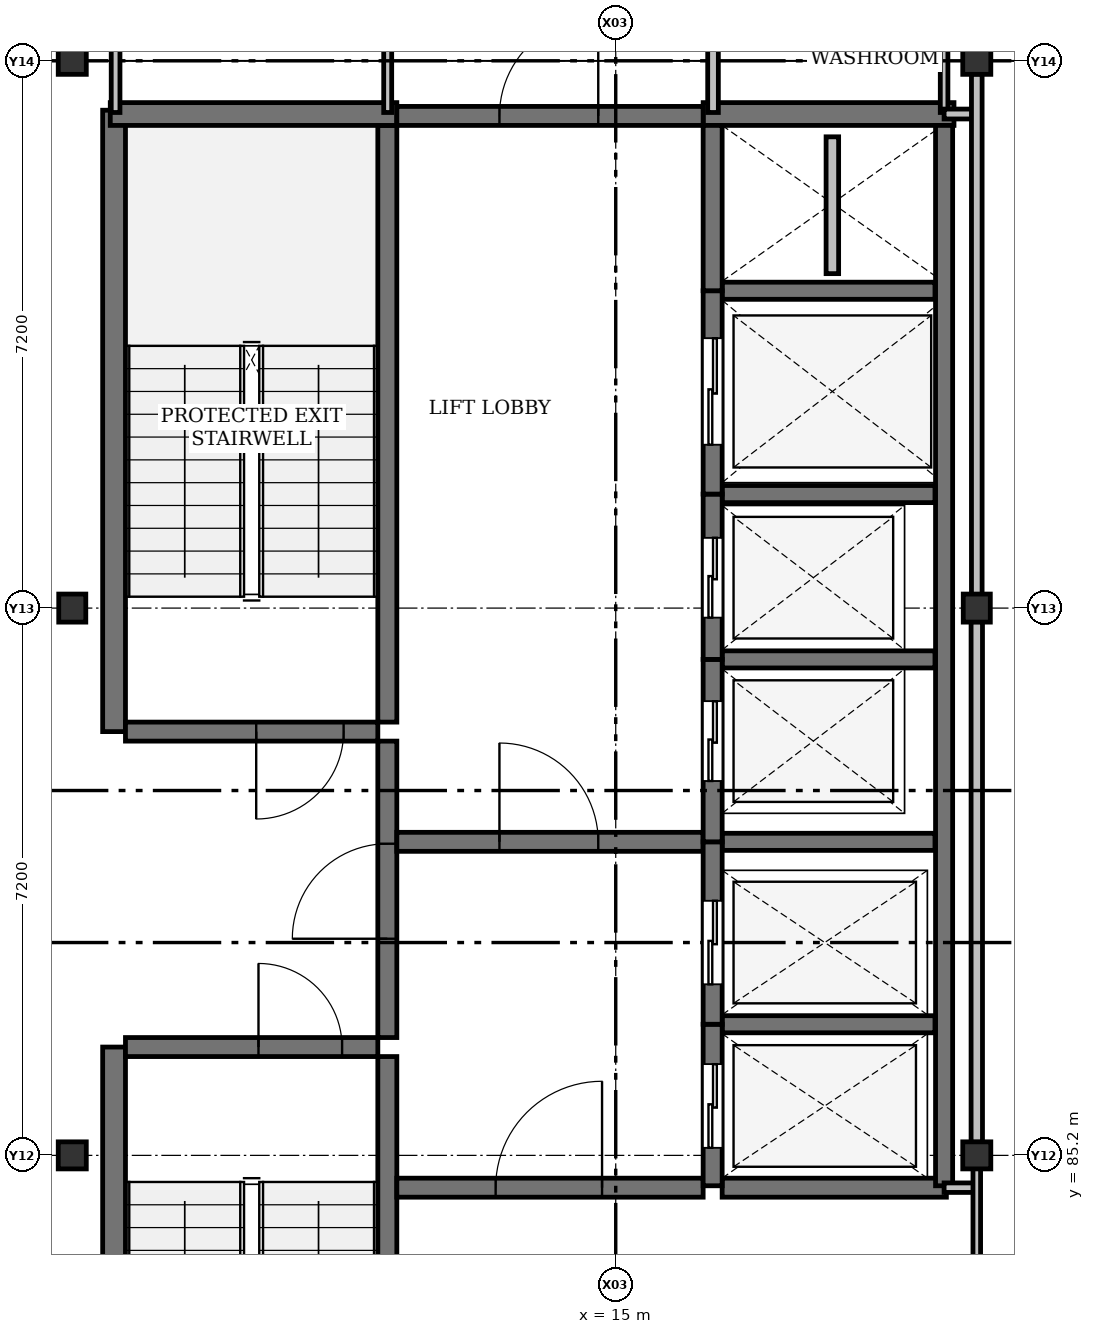
"""IFC4 building model, lengths in metres.
Left out: names, types, materials, properties, quantities, classifications, styles, units other than length and angle.
Written with IfcOpenShell. Run it as: python <this file> out.ifc"""

import sys

from ifc_helpers import new_model, si_unit, direction, frame, frame_2d, origin, origin_2d, place, context, subcontext, project, spatial, rectangle, i_section, extrude, element, fill, save


model = new_model("IFC4")
c1 = context("Model", 3, precision=1e-05, world=origin(), true_north=direction((0.0, 1.0)))
c2 = subcontext(c1, "Body", "Model", "MODEL_VIEW")
j1 = project(units=[si_unit("LENGTHUNIT", "METRE"), si_unit("PLANEANGLEUNIT", "RADIAN")], contexts=[c1])
p1 = place(None, origin())
s1 = spatial("IfcSite", under=j1, at=p1, CompositionType="ELEMENT")
p2 = place(p1, origin())
s2 = spatial("IfcBuilding", under=s1, at=p2, CompositionType="ELEMENT")
p3 = place(p2, frame((0.0, 0.0, 51.9)))
s3 = spatial("IfcBuildingStorey", under=s2, at=p3, CompositionType="ELEMENT", Elevation=51.9)
for number, where, z_axis, x_axis in (
    (1, (7.85, 85.2, 0.0), (0.0, 0.0, 1.0), (1.0, 0.0, 0.0)),
    (2, (19.75, 85.2, 0.0), (0.0, 0.0, 1.0), (1.0, 0.0, 0.0)),
    (3, (7.85, 92.4, 0.0), (0.0, 0.0, 1.0), (0.0, 1.0, 0.0)),
    (4, (19.75, 92.4, 0.0), (0.0, 0.0, 1.0), (0.0, 1.0, 0.0)),
    (5, (7.85, 99.6, 0.0), (0.0, 0.0, 1.0), (1.0, 0.0, 0.0)),
    (6, (19.75, 99.6, 0.0), (0.0, 0.0, 1.0), (1.0, 0.0, 0.0)),
):
    element("IfcColumn", number, at=place(p3, frame(where, z_axis=z_axis, x_axis=x_axis)), inside=s3, PredefinedType="COLUMN", context=c2, shape_type="SweptSolid", body=[
        extrude(i_section(OverallWidth=0.369, OverallDepth=0.356, WebThickness=0.011, FlangeThickness=0.018, FilletRadius=0.015, at=origin_2d()), origin(), (0.0, 0.0, 1.0), 4.2),
    ])
for number, where, z_axis, x_axis in (
    (7, (8.4, 78.45, 0.0), (0.0, 0.0, 1.0), (0.0, 1.0, 0.0)),
    (8, (8.4, 90.775, 0.0), (0.0, 0.0, 1.0), (0.0, 1.0, 0.0)),
):
    element("IfcWall", number, at=place(p3, frame(where, z_axis=z_axis, x_axis=x_axis)), inside=s3, PredefinedType="SHEAR", context=c2, shape_type="SweptSolid", body=[
        extrude(rectangle(XDim=8.175, YDim=0.3, at=frame_2d((4.087, 0.0))), origin(), (0.0, 0.0, 1.0), 4.2),
    ])
for number, where, z_axis, x_axis in (
    (9, (11.995, 78.65, 0.0), (0.0, 0.0, 1.0), (0.0, 1.0, 0.0)),
    (10, (11.995, 90.9, 0.0), (0.0, 0.0, 1.0), (0.0, 1.0, 0.0)),
):
    element("IfcWall", number, at=place(p3, frame(where, z_axis=z_axis, x_axis=x_axis)), inside=s3, PredefinedType="SHEAR", context=c2, shape_type="SweptSolid", body=[
        extrude(rectangle(XDim=7.85, YDim=0.25, at=frame_2d((3.925, 0.0))), origin(), (0.0, 0.0, 1.0), 4.2),
    ])
p4 = place(p3, frame((11.995, 86.75, 0.0), z_axis=(0.0, 0.0, 1.0), x_axis=(0.0, 1.0, 0.0)))
e11 = element("IfcWall", 11, at=p4, inside=s3, PredefinedType="SHEAR", context=c2, shape_type="SweptSolid", body=[
    extrude(rectangle(XDim=3.9, YDim=0.25, at=frame_2d((1.95, 0.0))), origin(), (0.0, 0.0, 1.0), 4.2),
])
p5 = place(p4, frame((1.3, 0.0, 0.0)))
e12 = element("IfcOpeningElement", 12, at=p5, cuts=e11, PredefinedType="OPENING", context=c2, shape_type="SweptSolid", body=[
    extrude(rectangle(XDim=1.25, YDim=2.2, at=frame_2d((0.625, 1.1))), frame((0.0, 0.125, 0.0), z_axis=(0.0, -1.0, 0.0), x_axis=(1.0, 0.0, 0.0)), (0.0, 0.0, 1.0), 0.25),
])
p6 = place(p3, frame((8.35, 98.9, 0.0), z_axis=(0.0, 0.0, 1.0), x_axis=(1.0, 0.0, 0.0)))
e13 = element("IfcWall", 13, at=p6, inside=s3, PredefinedType="SHEAR", context=c2, shape_type="SweptSolid", body=[
    extrude(rectangle(XDim=3.77, YDim=0.3, at=frame_2d((1.885, 0.0))), origin(), (0.0, 0.0, 1.0), 4.2),
])
p7 = place(p3, frame((16.15, 98.9, 0.0), z_axis=(0.0, 0.0, 1.0), x_axis=(1.0, 0.0, 0.0)))
e14 = element("IfcWall", 14, at=p7, inside=s3, PredefinedType="SHEAR", context=c2, shape_type="SweptSolid", body=[
    extrude(rectangle(XDim=3.3, YDim=0.3, at=frame_2d((1.65, 0.0))), origin(), (0.0, 0.0, 1.0), 4.2),
])
p8 = place(p3, frame((12.12, 98.875, 0.0), z_axis=(0.0, 0.0, 1.0), x_axis=(1.0, 0.0, 0.0)))
e15 = element("IfcWall", 15, at=p8, inside=s3, PredefinedType="SHEAR", context=c2, shape_type="SweptSolid", body=[
    extrude(rectangle(XDim=4.03, YDim=0.25, at=frame_2d((2.015, 0.0))), origin(), (0.0, 0.0, 1.0), 4.2),
])
p9 = place(p8, frame((1.35, 0.0, 0.0)))
e16 = element("IfcOpeningElement", 16, at=p9, cuts=e15, PredefinedType="OPENING", context=c2, shape_type="SweptSolid", body=[
    extrude(rectangle(XDim=1.3, YDim=2.2, at=frame_2d((0.65, 1.1))), frame((0.0, 0.125, 0.0), z_axis=(0.0, -1.0, 0.0), x_axis=(1.0, 0.0, 0.0)), (0.0, 0.0, 1.0), 0.25),
])
p10 = place(p3, frame((8.55, 86.625, 0.0), z_axis=(0.0, 0.0, 1.0), x_axis=(1.0, 0.0, 0.0)))
e17 = element("IfcWall", 17, at=p10, inside=s3, PredefinedType="SHEAR", context=c2, shape_type="SweptSolid", body=[
    extrude(rectangle(XDim=3.32, YDim=0.25, at=frame_2d((1.66, 0.0))), origin(), (0.0, 0.0, 1.0), 4.2),
])
p11 = place(p10, frame((1.75, 0.0, 0.0)))
e18 = element("IfcOpeningElement", 18, at=p11, cuts=e17, PredefinedType="OPENING", context=c2, shape_type="SweptSolid", body=[
    extrude(rectangle(XDim=1.1, YDim=2.15, at=frame_2d((0.55, 1.075))), frame((0.0, 0.125, 0.0), z_axis=(0.0, -1.0, 0.0), x_axis=(1.0, 0.0, 0.0)), (0.0, 0.0, 1.0), 0.25),
])
p12 = place(p3, frame((11.87, 90.775, 0.0), z_axis=(0.0, 0.0, 1.0), x_axis=(-1.0, 0.0, 0.0)))
e19 = element("IfcWall", 19, at=p12, inside=s3, PredefinedType="SHEAR", context=c2, shape_type="SweptSolid", body=[
    extrude(rectangle(XDim=3.32, YDim=0.25, at=frame_2d((1.66, 0.0))), origin(), (0.0, 0.0, 1.0), 4.2),
])
p13 = place(p12, frame((0.45, 0.0, 0.0)))
e20 = element("IfcOpeningElement", 20, at=p13, cuts=e19, PredefinedType="OPENING", context=c2, shape_type="SweptSolid", body=[
    extrude(rectangle(XDim=1.15, YDim=2.15, at=frame_2d((0.575, 1.075))), frame((0.0, 0.125, 0.0), z_axis=(0.0, -1.0, 0.0), x_axis=(1.0, 0.0, 0.0)), (0.0, 0.0, 1.0), 0.25),
])
p14 = place(p3, frame((12.12, 89.325, 0.0), z_axis=(0.0, 0.0, 1.0), x_axis=(1.0, 0.0, 0.0)))
e21 = element("IfcWall", 21, at=p14, inside=s3, PredefinedType="SHEAR", context=c2, shape_type="SweptSolid", body=[
    extrude(rectangle(XDim=4.03, YDim=0.25, at=frame_2d((2.015, 0.0))), origin(), (0.0, 0.0, 1.0), 4.2),
])
p15 = place(p14, frame((1.35, 0.0, 0.0)))
e22 = element("IfcOpeningElement", 22, at=p15, cuts=e21, PredefinedType="OPENING", context=c2, shape_type="SweptSolid", body=[
    extrude(rectangle(XDim=1.3, YDim=2.2, at=frame_2d((0.65, 1.1))), frame((0.0, 0.125, 0.0), z_axis=(0.0, -1.0, 0.0), x_axis=(1.0, 0.0, 0.0)), (0.0, 0.0, 1.0), 0.25),
])
p16 = place(p3, frame((12.12, 84.775, 0.0), z_axis=(0.0, 0.0, 1.0), x_axis=(1.0, 0.0, 0.0)))
e23 = element("IfcWall", 23, at=p16, inside=s3, PredefinedType="SHEAR", context=c2, shape_type="SweptSolid", body=[
    extrude(rectangle(XDim=4.03, YDim=0.25, at=frame_2d((2.015, 0.0))), origin(), (0.0, 0.0, 1.0), 4.2),
])
p17 = place(p16, frame((1.3, 0.0, 0.0)))
e24 = element("IfcOpeningElement", 24, at=p17, cuts=e23, PredefinedType="OPENING", context=c2, shape_type="SweptSolid", body=[
    extrude(rectangle(XDim=1.4, YDim=2.25, at=frame_2d((0.7, 1.125))), frame((0.0, 0.125, 0.0), z_axis=(0.0, -1.0, 0.0), x_axis=(1.0, 0.0, 0.0)), (0.0, 0.0, 1.0), 0.25),
])
p18 = place(p3, frame((16.4, 84.775, 0.0), z_axis=(0.0, 0.0, 1.0), x_axis=(1.0, 0.0, 0.0)))
e25 = element("IfcWall", 25, at=p18, inside=s3, PredefinedType="SHEAR", context=c2, shape_type="SweptSolid", body=[
    extrude(rectangle(XDim=2.95, YDim=0.25, at=frame_2d((1.475, 0.0))), origin(), (0.0, 0.0, 1.0), 4.2),
])
p19 = place(p3, frame((19.32, 84.8, 0.0), z_axis=(0.0, 0.0, 1.0), x_axis=(0.0, 1.0, 0.0)))
e26 = element("IfcWall", 26, at=p19, inside=s3, PredefinedType="SHEAR", context=c2, shape_type="SweptSolid", body=[
    extrude(rectangle(XDim=13.95, YDim=0.225, at=frame_2d((6.975, 0.0))), origin(), (0.0, 0.0, 1.0), 4.2),
])
for number, where, z_axis, x_axis in (
    (27, (16.4, 86.925, 0.0), (0.0, 0.0, 1.0), (1.0, 0.0, 0.0)),
    (28, (16.4, 89.325, 0.0), (0.0, 0.0, 1.0), (1.0, 0.0, 0.0)),
    (29, (16.4, 91.725, 0.0), (0.0, 0.0, 1.0), (1.0, 0.0, 0.0)),
    (30, (16.4, 93.9, 0.0), (0.0, 0.0, 1.0), (1.0, 0.0, 0.0)),
    (31, (16.4, 96.575, 0.0), (0.0, 0.0, 1.0), (1.0, 0.0, 0.0)),
):
    element("IfcWall", number, at=place(p3, frame(where, z_axis=z_axis, x_axis=x_axis)), inside=s3, PredefinedType="SHEAR", context=c2, shape_type="SweptSolid", body=[
        extrude(rectangle(XDim=2.8, YDim=0.225, at=frame_2d((1.4, 0.0))), origin(), (0.0, 0.0, 1.0), 4.2),
    ])
p20 = place(p3, frame((16.275, 84.8, 0.0), z_axis=(0.0, 0.0, 1.0), x_axis=(0.0, 1.0, 0.0)))
e32 = element("IfcWall", 32, at=p20, inside=s3, PredefinedType="SHEAR", context=c2, shape_type="SweptSolid", body=[
    extrude(rectangle(XDim=2.125, YDim=0.25, at=frame_2d((1.062, 0.0))), origin(), (0.0, 0.0, 1.0), 4.2),
])
p21 = place(p20, frame((0.5, 0.0, 0.0)))
e33 = element("IfcOpeningElement", 33, at=p21, cuts=e32, PredefinedType="OPENING", context=c2, shape_type="SweptSolid", body=[
    extrude(rectangle(XDim=1.1, YDim=2.15, at=frame_2d((0.55, 1.075))), frame((0.0, 0.125, 0.0), z_axis=(0.0, -1.0, 0.0), x_axis=(1.0, 0.0, 0.0)), (0.0, 0.0, 1.0), 0.25),
])
p22 = place(p3, frame((16.275, 86.925, 0.0), z_axis=(0.0, 0.0, 1.0), x_axis=(0.0, 1.0, 0.0)))
e34 = element("IfcWall", 34, at=p22, inside=s3, PredefinedType="SHEAR", context=c2, shape_type="SweptSolid", body=[
    extrude(rectangle(XDim=2.4, YDim=0.25, at=frame_2d((1.2, 0.0))), origin(), (0.0, 0.0, 1.0), 4.2),
])
p23 = place(p22, frame((0.525, 0.0, 0.0)))
e35 = element("IfcOpeningElement", 35, at=p23, cuts=e34, PredefinedType="OPENING", context=c2, shape_type="SweptSolid", body=[
    extrude(rectangle(XDim=1.1, YDim=2.15, at=frame_2d((0.55, 1.075))), frame((0.0, 0.125, 0.0), z_axis=(0.0, -1.0, 0.0), x_axis=(1.0, 0.0, 0.0)), (0.0, 0.0, 1.0), 0.25),
])
p24 = place(p3, frame((16.275, 89.325, 0.0), z_axis=(0.0, 0.0, 1.0), x_axis=(0.0, 1.0, 0.0)))
e36 = element("IfcWall", 36, at=p24, inside=s3, PredefinedType="SHEAR", context=c2, shape_type="SweptSolid", body=[
    extrude(rectangle(XDim=2.4, YDim=0.25, at=frame_2d((1.2, 0.0))), origin(), (0.0, 0.0, 1.0), 4.2),
])
p25 = place(p24, frame((0.8, 0.0, 0.0)))
e37 = element("IfcOpeningElement", 37, at=p25, cuts=e36, PredefinedType="OPENING", context=c2, shape_type="SweptSolid", body=[
    extrude(rectangle(XDim=1.05, YDim=2.15, at=frame_2d((0.525, 1.075))), frame((0.0, 0.125, 0.0), z_axis=(0.0, -1.0, 0.0), x_axis=(1.0, 0.0, 0.0)), (0.0, 0.0, 1.0), 0.25),
])
p26 = place(p3, frame((16.275, 91.725, 0.0), z_axis=(0.0, 0.0, 1.0), x_axis=(0.0, 1.0, 0.0)))
e38 = element("IfcWall", 38, at=p26, inside=s3, PredefinedType="SHEAR", context=c2, shape_type="SweptSolid", body=[
    extrude(rectangle(XDim=2.175, YDim=0.25, at=frame_2d((1.087, 0.0))), origin(), (0.0, 0.0, 1.0), 4.2),
])
p27 = place(p26, frame((0.55, 0.0, 0.0)))
e39 = element("IfcOpeningElement", 39, at=p27, cuts=e38, PredefinedType="OPENING", context=c2, shape_type="SweptSolid", body=[
    extrude(rectangle(XDim=1.05, YDim=2.15, at=frame_2d((0.525, 1.075))), frame((0.0, 0.125, 0.0), z_axis=(0.0, -1.0, 0.0), x_axis=(1.0, 0.0, 0.0)), (0.0, 0.0, 1.0), 0.25),
])
p28 = place(p3, frame((16.275, 93.9, 0.0), z_axis=(0.0, 0.0, 1.0), x_axis=(0.0, 1.0, 0.0)))
e40 = element("IfcWall", 40, at=p28, inside=s3, PredefinedType="SHEAR", context=c2, shape_type="SweptSolid", body=[
    extrude(rectangle(XDim=2.675, YDim=0.25, at=frame_2d((1.337, 0.0))), origin(), (0.0, 0.0, 1.0), 4.2),
])
p29 = place(p28, frame((0.65, 0.0, 0.0)))
e41 = element("IfcOpeningElement", 41, at=p29, cuts=e40, PredefinedType="OPENING", context=c2, shape_type="SweptSolid", body=[
    extrude(rectangle(XDim=1.4, YDim=2.25, at=frame_2d((0.7, 1.125))), frame((0.0, 0.125, 0.0), z_axis=(0.0, -1.0, 0.0), x_axis=(1.0, 0.0, 0.0)), (0.0, 0.0, 1.0), 0.25),
])
p30 = place(p3, frame((16.275, 96.575, 0.0), z_axis=(0.0, 0.0, 1.0), x_axis=(0.0, 1.0, 0.0)))
e42 = element("IfcWall", 42, at=p30, inside=s3, PredefinedType="SHEAR", context=c2, shape_type="SweptSolid", body=[
    extrude(rectangle(XDim=2.175, YDim=0.25, at=frame_2d((1.087, 0.0))), origin(), (0.0, 0.0, 1.0), 4.2),
])
p31 = place(p3, frame((17.85, 96.8, 0.0), z_axis=(0.0, 0.0, 1.0), x_axis=(0.0, 1.0, 0.0)))
e43 = element("IfcWall", 43, at=p31, inside=s3, PredefinedType="PLUMBINGWALL", context=c2, shape_type="SweptSolid", body=[
    extrude(rectangle(XDim=1.8, YDim=0.165, at=frame_2d((0.9, 0.0))), origin(), (0.0, 0.0, 1.0), 4.2),
])
p32 = place(p3, frame((8.42, 98.92, 0.0), z_axis=(0.0, 0.0, 1.0), x_axis=(0.0, 1.0, 0.0)))
e44 = element("IfcWall", 44, at=p32, inside=s3, PredefinedType="PARTITIONING", context=c2, shape_type="SweptSolid", body=[
    extrude(rectangle(XDim=2.74, YDim=0.115, at=frame_2d((1.37, 0.0))), origin(), (0.0, 0.0, 1.0), 3.451),
])
p33 = place(p3, frame((12.0, 101.6, 0.0), z_axis=(0.0, 0.0, 1.0), x_axis=(0.0, -1.0, 0.0)))
e45 = element("IfcWall", 45, at=p33, inside=s3, PredefinedType="PARTITIONING", context=c2, shape_type="SweptSolid", body=[
    extrude(rectangle(XDim=2.68, YDim=0.105, at=frame_2d((1.34, 0.0))), origin(), (0.0, 0.0, 1.0), 3.451),
])
p34 = place(p33, frame((0.84, 0.0, 0.0)))
e46 = element("IfcOpeningElement", 46, at=p34, cuts=e45, PredefinedType="OPENING", context=c2, shape_type="SweptSolid", body=[
    extrude(rectangle(XDim=1.0, YDim=2.25, at=frame_2d((0.5, 1.125))), frame((0.0, 0.052, 0.0), z_axis=(0.0, -1.0, 0.0), x_axis=(1.0, 0.0, 0.0)), (0.0, 0.0, 1.0), 0.105),
])
p35 = place(p3, frame((19.32, 98.92, 0.0), z_axis=(0.0, 0.0, 1.0), x_axis=(0.0, 1.0, 0.0)))
e47 = element("IfcWall", 47, at=p35, inside=s3, PredefinedType="PARTITIONING", context=c2, shape_type="SweptSolid", body=[
    extrude(rectangle(XDim=2.74, YDim=0.1, at=frame_2d((1.37, 0.0))), origin(), (0.0, 0.0, 1.0), 3.451),
])
p36 = place(p3, frame((16.28, 98.92, 0.0), z_axis=(0.0, 0.0, 1.0), x_axis=(0.0, 1.0, 0.0)))
e48 = element("IfcWall", 48, at=p36, inside=s3, PredefinedType="PARTITIONING", context=c2, shape_type="SweptSolid", body=[
    extrude(rectangle(XDim=2.68, YDim=0.14, at=frame_2d((1.34, 0.0))), origin(), (0.0, 0.0, 1.0), 3.451),
])
p37 = place(p36, frame((0.89, 0.0, 0.0)))
e49 = element("IfcOpeningElement", 49, at=p37, cuts=e48, PredefinedType="OPENING", context=c2, shape_type="SweptSolid", body=[
    extrude(rectangle(XDim=0.9, YDim=2.08, at=frame_2d((0.45, 1.04))), frame((0.0, 0.07, 0.0), z_axis=(0.0, -1.0, 0.0), x_axis=(1.0, 0.0, 0.0)), (0.0, 0.0, 1.0), 0.14),
])
p38 = place(p3, frame((19.75, 98.9, 0.0), z_axis=(0.0, 0.0, 1.0), x_axis=(-1.0, 0.0, 0.0)))
e50 = element("IfcWall", 50, at=p38, inside=s3, PredefinedType="PARTITIONING", context=c2, shape_type="SweptSolid", body=[
    extrude(rectangle(XDim=0.43, YDim=0.13, at=frame_2d((0.215, 0.0))), origin(), (0.0, 0.0, 1.0), 3.527),
])
p39 = place(p3, frame((19.32, 84.775, 0.0), z_axis=(0.0, 0.0, 1.0), x_axis=(1.0, 0.0, 0.0)))
e51 = element("IfcWall", 51, at=p39, inside=s3, PredefinedType="PARTITIONING", context=c2, shape_type="SweptSolid", body=[
    extrude(rectangle(XDim=0.43, YDim=0.125, at=frame_2d((0.215, 0.0))), origin(), (0.0, 0.0, 1.0), 3.527),
])
p40 = place(p3, frame((19.75, 78.179, 0.0), z_axis=(0.0, 0.0, 1.0), x_axis=(0.0, 1.0, 0.0)))
e52 = element("IfcWall", 52, at=p40, inside=s3, PredefinedType="PARTITIONING", context=c2, shape_type="SweptSolid", body=[
    extrude(rectangle(XDim=6.848, YDim=0.1, at=frame_2d((3.424, 0.0))), origin(), (0.0, 0.0, 1.0), 3.527),
])
p41 = place(p3, frame((19.75, 85.373, 0.0), z_axis=(0.0, 0.0, 1.0), x_axis=(0.0, 1.0, 0.0)))
e53 = element("IfcWall", 53, at=p41, inside=s3, PredefinedType="PARTITIONING", context=c2, shape_type="SweptSolid", body=[
    extrude(rectangle(XDim=6.847, YDim=0.15, at=frame_2d((3.424, 0.0))), origin(), (0.0, 0.0, 1.0), 3.527),
])
p42 = place(p3, frame((19.75, 92.58, 0.0), z_axis=(0.0, 0.0, 1.0), x_axis=(0.0, 1.0, 0.0)))
e54 = element("IfcWall", 54, at=p42, inside=s3, PredefinedType="PARTITIONING", context=c2, shape_type="SweptSolid", body=[
    extrude(rectangle(XDim=6.847, YDim=0.14, at=frame_2d((3.424, 0.0))), origin(), (0.0, 0.0, 1.0), 3.527),
])
p43 = place(p5, origin())
e55 = element("IfcDoor", 55, at=p43, inside=s3, OperationType="SINGLE_SWING_LEFT", PredefinedType="DOOR", context=c2, shape_type="SweptSolid", body=[
    extrude(rectangle(XDim=1.25, YDim=2.2, at=frame_2d((0.625, 1.1))), frame((0.0, 0.025, 0.0), z_axis=(0.0, -1.0, 0.0), x_axis=(1.0, 0.0, 0.0)), (0.0, 0.0, 1.0), 0.05),
])
fill(e12, e55)
p44 = place(p9, origin())
e56 = element("IfcDoor", 56, at=p44, inside=s3, OperationType="SINGLE_SWING_RIGHT", PredefinedType="DOOR", context=c2, shape_type="SweptSolid", body=[
    extrude(rectangle(XDim=1.3, YDim=2.2, at=frame_2d((0.65, 1.1))), frame((0.0, 0.025, 0.0), z_axis=(0.0, -1.0, 0.0), x_axis=(1.0, 0.0, 0.0)), (0.0, 0.0, 1.0), 0.05),
])
fill(e16, e56)
p45 = place(p11, origin())
e57 = element("IfcDoor", 57, at=p45, inside=s3, OperationType="SINGLE_SWING_LEFT", PredefinedType="DOOR", context=c2, shape_type="SweptSolid", body=[
    extrude(rectangle(XDim=1.1, YDim=2.15, at=frame_2d((0.55, 1.075))), frame((0.0, 0.025, 0.0), z_axis=(0.0, -1.0, 0.0), x_axis=(1.0, 0.0, 0.0)), (0.0, 0.0, 1.0), 0.05),
])
fill(e18, e57)
p46 = place(p13, origin())
e58 = element("IfcDoor", 58, at=p46, inside=s3, OperationType="SINGLE_SWING_RIGHT", PredefinedType="DOOR", context=c2, shape_type="SweptSolid", body=[
    extrude(rectangle(XDim=1.15, YDim=2.15, at=frame_2d((0.575, 1.075))), frame((0.0, 0.025, 0.0), z_axis=(0.0, -1.0, 0.0), x_axis=(1.0, 0.0, 0.0)), (0.0, 0.0, 1.0), 0.05),
])
fill(e20, e58)
p47 = place(p15, origin())
e59 = element("IfcDoor", 59, at=p47, inside=s3, OperationType="SINGLE_SWING_LEFT", PredefinedType="DOOR", context=c2, shape_type="SweptSolid", body=[
    extrude(rectangle(XDim=1.3, YDim=2.2, at=frame_2d((0.65, 1.1))), frame((0.0, 0.025, 0.0), z_axis=(0.0, -1.0, 0.0), x_axis=(1.0, 0.0, 0.0)), (0.0, 0.0, 1.0), 0.05),
])
fill(e22, e59)
p48 = place(p17, origin())
e60 = element("IfcDoor", 60, at=p48, inside=s3, OperationType="SINGLE_SWING_RIGHT", PredefinedType="DOOR", context=c2, shape_type="SweptSolid", body=[
    extrude(rectangle(XDim=1.4, YDim=2.25, at=frame_2d((0.7, 1.125))), frame((0.0, 0.025, 0.0), z_axis=(0.0, -1.0, 0.0), x_axis=(1.0, 0.0, 0.0)), (0.0, 0.0, 1.0), 0.05),
])
fill(e24, e60)
p49 = place(p21, origin())
e61 = element("IfcDoor", 61, at=p49, inside=s3, OperationType="SLIDING_TO_LEFT", PredefinedType="DOOR", context=c2, shape_type="SweptSolid", body=[
    extrude(rectangle(XDim=1.1, YDim=2.15, at=frame_2d((0.55, 1.075))), frame((0.0, 0.025, 0.0), z_axis=(0.0, -1.0, 0.0), x_axis=(1.0, 0.0, 0.0)), (0.0, 0.0, 1.0), 0.05),
])
fill(e33, e61)
p50 = place(p23, origin())
e62 = element("IfcDoor", 62, at=p50, inside=s3, OperationType="SLIDING_TO_LEFT", PredefinedType="DOOR", context=c2, shape_type="SweptSolid", body=[
    extrude(rectangle(XDim=1.1, YDim=2.15, at=frame_2d((0.55, 1.075))), frame((0.0, 0.025, 0.0), z_axis=(0.0, -1.0, 0.0), x_axis=(1.0, 0.0, 0.0)), (0.0, 0.0, 1.0), 0.05),
])
fill(e35, e62)
p51 = place(p25, origin())
e63 = element("IfcDoor", 63, at=p51, inside=s3, OperationType="SLIDING_TO_LEFT", PredefinedType="DOOR", context=c2, shape_type="SweptSolid", body=[
    extrude(rectangle(XDim=1.05, YDim=2.15, at=frame_2d((0.525, 1.075))), frame((0.0, 0.025, 0.0), z_axis=(0.0, -1.0, 0.0), x_axis=(1.0, 0.0, 0.0)), (0.0, 0.0, 1.0), 0.05),
])
fill(e37, e63)
p52 = place(p27, origin())
e64 = element("IfcDoor", 64, at=p52, inside=s3, OperationType="SLIDING_TO_LEFT", PredefinedType="DOOR", context=c2, shape_type="SweptSolid", body=[
    extrude(rectangle(XDim=1.05, YDim=2.15, at=frame_2d((0.525, 1.075))), frame((0.0, 0.025, 0.0), z_axis=(0.0, -1.0, 0.0), x_axis=(1.0, 0.0, 0.0)), (0.0, 0.0, 1.0), 0.05),
])
fill(e39, e64)
p53 = place(p29, origin())
e65 = element("IfcDoor", 65, at=p53, inside=s3, OperationType="SLIDING_TO_LEFT", PredefinedType="DOOR", context=c2, shape_type="SweptSolid", body=[
    extrude(rectangle(XDim=1.4, YDim=2.25, at=frame_2d((0.7, 1.125))), frame((0.0, 0.025, 0.0), z_axis=(0.0, -1.0, 0.0), x_axis=(1.0, 0.0, 0.0)), (0.0, 0.0, 1.0), 0.05),
])
fill(e41, e65)
save(model, sys.argv[1])
